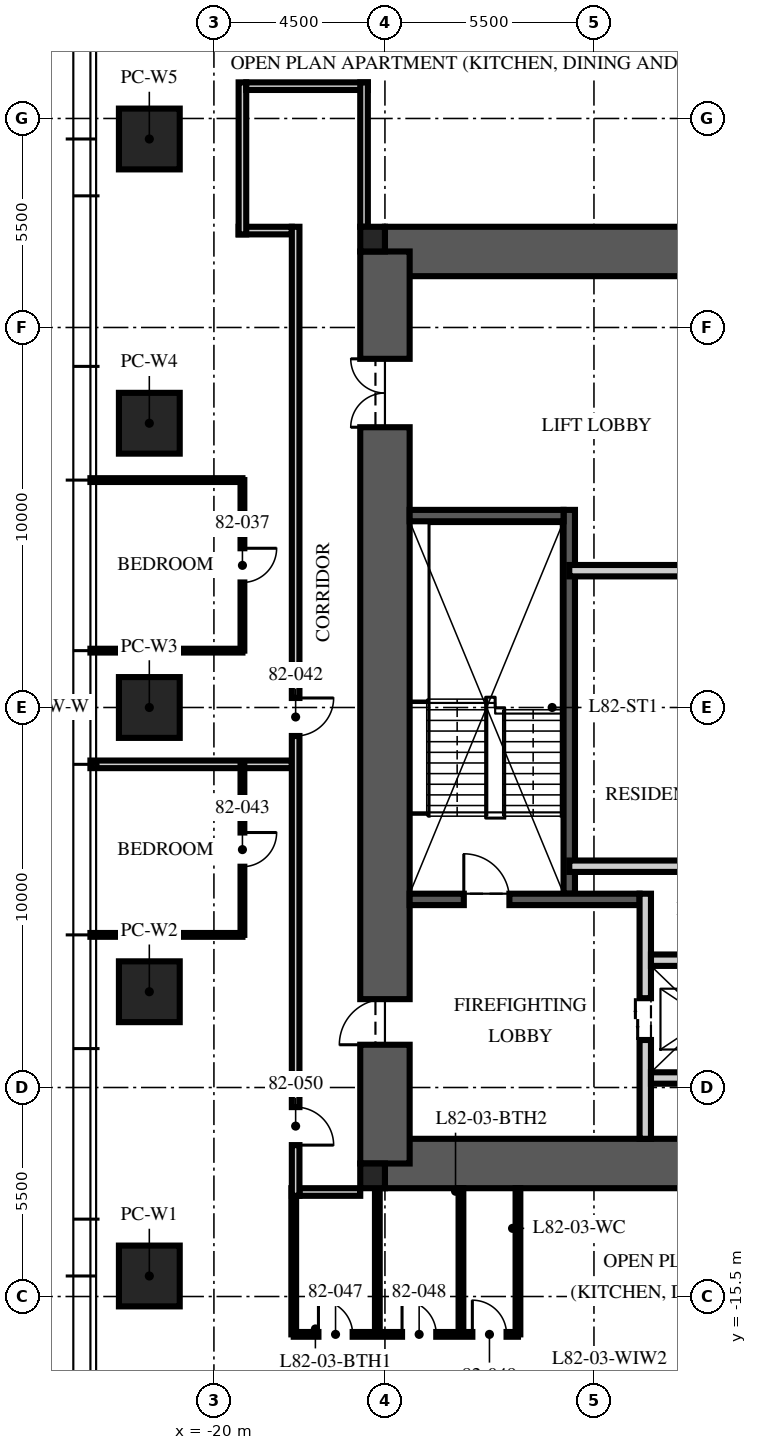
"""IFC4 building model, lengths in metres.
Left out: names, types, materials, properties, quantities, classifications, styles, units other than length and angle.
Written with IfcOpenShell. Run it as: python <this file> out.ifc"""

import sys

from ifc_helpers import new_model, si_unit, direction, frame, frame_2d, origin, origin_2d, place, context, subcontext, project, spatial, rectangle, extrude, element, fill, save


model = new_model("IFC4")
c1 = context("Model", 3, precision=1e-05, world=origin(), true_north=direction((0.0, 1.0)))
c2 = subcontext(c1, "Body", "Model", "MODEL_VIEW")
j1 = project(units=[si_unit("LENGTHUNIT", "METRE"), si_unit("PLANEANGLEUNIT", "RADIAN")], contexts=[c1])
p1 = place(None, origin())
s1 = spatial("IfcSite", under=j1, at=p1, CompositionType="ELEMENT")
p2 = place(p1, origin())
s2 = spatial("IfcBuilding", under=s1, at=p2, CompositionType="ELEMENT")
p3 = place(p2, frame((0.0, 0.0, 327.0)))
s3 = spatial("IfcBuildingStorey", under=s2, at=p3, CompositionType="ELEMENT", Elevation=327.0)
for number, where, z_axis, x_axis in (
    (1, (-15.5, 12.0, -0.25), (0.0, 0.0, 1.0), (1.0, 0.0, 0.0)),
    (2, (-15.5, -12.0, -0.25), (0.0, 0.0, 1.0), (1.0, 0.0, 0.0)),
):
    element("IfcWall", number, at=place(p3, frame(where, z_axis=z_axis, x_axis=x_axis)), inside=s3, PredefinedType="SHEAR", context=c2, shape_type="SweptSolid", body=[
        extrude(rectangle(XDim=31.0, YDim=1.3, at=frame_2d((15.5, 0.0))), origin(), (0.0, 0.0, 1.0), 3.75),
    ])
p4 = place(p3, frame((-15.5, -12.0, -0.25), z_axis=(0.0, 0.0, 1.0), x_axis=(0.0, 1.0, 0.0)))
e3 = element("IfcWall", 3, at=p4, inside=s3, PredefinedType="SHEAR", context=c2, shape_type="SweptSolid", body=[
    extrude(rectangle(XDim=24.0, YDim=1.3, at=frame_2d((12.0, 0.0))), origin(), (0.0, 0.0, 1.0), 3.75),
])
p5 = place(p4, frame((3.125, 0.0, 0.25)))
e4 = element("IfcOpeningElement", 4, at=p5, cuts=e3, PredefinedType="OPENING", context=c2, shape_type="SweptSolid", body=[
    extrude(rectangle(XDim=1.2, YDim=2.1, at=frame_2d((0.6, 1.05))), frame((0.0, 0.66, 0.0), z_axis=(0.0, -1.0, 0.0), x_axis=(1.0, 0.0, 0.0)), (0.0, 0.0, 1.0), 1.32),
])
p6 = place(p4, frame((19.375, 0.0, 0.25)))
e5 = element("IfcOpeningElement", 5, at=p6, cuts=e3, PredefinedType="OPENING", context=c2, shape_type="SweptSolid", body=[
    extrude(rectangle(XDim=1.8, YDim=2.1, at=frame_2d((0.9, 1.05))), frame((0.0, 0.66, 0.0), z_axis=(0.0, -1.0, 0.0), x_axis=(1.0, 0.0, 0.0)), (0.0, 0.0, 1.0), 1.32),
])
for number, where, z_axis, x_axis in (
    (6, (-15.825, 12.325, -0.25), (0.0, 0.0, 1.0), (1.0, 0.0, 0.0)),
    (7, (-15.825, -12.325, -0.25), (0.0, 0.0, 1.0), (1.0, 0.0, 0.0)),
):
    element("IfcColumn", number, at=place(p3, frame(where, z_axis=z_axis, x_axis=x_axis)), inside=s3, PredefinedType="COLUMN", context=c2, shape_type="SweptSolid", body=[
        extrude(rectangle(XDim=0.65, YDim=0.65, at=origin_2d()), origin(), (0.0, 0.0, 1.0), 3.75),
    ])
for number, where, z_axis, x_axis in (
    (8, (-21.7, -14.96, 0.0), (0.0, 0.0, 1.0), (0.0, 1.0, 0.0)),
    (9, (-21.7, -7.48, 0.0), (0.0, 0.0, 1.0), (0.0, 1.0, 0.0)),
    (10, (-21.7, 0.0, 0.0), (0.0, 0.0, 1.0), (0.0, 1.0, 0.0)),
    (11, (-21.7, 7.48, 0.0), (0.0, 0.0, 1.0), (0.0, 1.0, 0.0)),
    (12, (-21.7, 14.96, 0.0), (0.0, 0.0, 1.0), (0.0, 1.0, 0.0)),
):
    element("IfcColumn", number, at=place(p3, frame(where, z_axis=z_axis, x_axis=x_axis)), inside=s3, PredefinedType="COLUMN", context=c2, shape_type="SweptSolid", body=[
        extrude(rectangle(XDim=1.6, YDim=1.6, at=origin_2d()), origin(), (0.0, 0.0, 1.0), 3.75),
    ])
p7 = place(p3, frame((-10.65, -4.9, 0.0), z_axis=(0.0, 0.0, 1.0), x_axis=(0.0, 1.0, 0.0)))
e13 = element("IfcWall", 13, at=p7, inside=s3, PredefinedType="SOLIDWALL", context=c2, shape_type="SweptSolid", body=[
    extrude(rectangle(XDim=10.1, YDim=0.3, at=frame_2d((5.05, 0.0))), origin(), (0.0, 0.0, 1.0), 3.5),
])
p8 = place(p3, frame((-14.85, -5.05, 0.0), z_axis=(0.0, 0.0, 1.0), x_axis=(1.0, 0.0, 0.0)))
e14 = element("IfcWall", 14, at=p8, inside=s3, PredefinedType="SOLIDWALL", context=c2, shape_type="SweptSolid", body=[
    extrude(rectangle(XDim=6.05, YDim=0.3, at=frame_2d((3.025, 0.0))), origin(), (0.0, 0.0, 1.0), 3.5),
])
p9 = place(p8, frame((1.425, 0.0, 0.0)))
e15 = element("IfcOpeningElement", 15, at=p9, cuts=e14, PredefinedType="OPENING", context=c2, shape_type="SweptSolid", body=[
    extrude(rectangle(XDim=1.2, YDim=2.1, at=frame_2d((0.6, 1.05))), frame((0.0, 0.16, 0.0), z_axis=(0.0, -1.0, 0.0), x_axis=(1.0, 0.0, 0.0)), (0.0, 0.0, 1.0), 0.32),
])
p10 = place(p3, frame((-14.85, 5.05, 0.0), z_axis=(0.0, 0.0, 1.0), x_axis=(1.0, 0.0, 0.0)))
e16 = element("IfcWall", 16, at=p10, inside=s3, PredefinedType="SOLIDWALL", context=c2, shape_type="SweptSolid", body=[
    extrude(rectangle(XDim=4.05, YDim=0.3, at=frame_2d((2.025, 0.0))), origin(), (0.0, 0.0, 1.0), 3.5),
])
p11 = place(p3, frame((-8.65, -11.35, 0.0), z_axis=(0.0, 0.0, 1.0), x_axis=(0.0, 1.0, 0.0)))
e17 = element("IfcWall", 17, at=p11, inside=s3, PredefinedType="PARTITIONING", context=c2, shape_type="SweptSolid", body=[
    extrude(rectangle(XDim=6.45, YDim=0.3, at=frame_2d((3.225, 0.0))), origin(), (0.0, 0.0, 1.0), 3.5),
])
p12 = place(p11, frame((2.6, 0.0, 0.0)))
e18 = element("IfcOpeningElement", 18, at=p12, cuts=e17, PredefinedType="OPENING", context=c2, shape_type="SweptSolid", body=[
    extrude(rectangle(XDim=1.1, YDim=2.1, at=frame_2d((0.55, 1.05))), frame((0.0, 0.16, 0.0), z_axis=(0.0, -1.0, 0.0), x_axis=(1.0, 0.0, 0.0)), (0.0, 0.0, 1.0), 0.32),
])
p13 = place(p3, frame((-8.5, -6.65, 0.0), z_axis=(0.0, 0.0, 1.0), x_axis=(1.0, 0.0, 0.0)))
e19 = element("IfcWall", 19, at=p13, inside=s3, PredefinedType="PARTITIONING", context=c2, shape_type="SweptSolid", body=[
    extrude(rectangle(XDim=17.0, YDim=0.3, at=frame_2d((8.5, 0.0))), origin(), (0.0, 0.0, 1.0), 3.5),
])
p14 = place(p13, frame((7.8, 0.0, 0.0)))
e20 = element("IfcOpeningElement", 20, at=p14, cuts=e19, PredefinedType="OPENING", context=c2, shape_type="SweptSolid", body=[
    extrude(rectangle(XDim=1.3, YDim=2.4, at=frame_2d((0.65, 1.2))), frame((0.0, 0.16, 0.0), z_axis=(0.0, -1.0, 0.0), x_axis=(1.0, 0.0, 0.0)), (0.0, 0.0, 1.0), 0.32),
])
p15 = place(p13, frame((5.65, 0.0, 0.0)))
e21 = element("IfcOpeningElement", 21, at=p15, cuts=e19, PredefinedType="OPENING", context=c2, shape_type="SweptSolid", body=[
    extrude(rectangle(XDim=0.9, YDim=2.1, at=frame_2d((0.45, 1.05))), frame((0.0, 0.16, 0.0), z_axis=(0.0, -1.0, 0.0), x_axis=(1.0, 0.0, 0.0)), (0.0, 0.0, 1.0), 0.32),
])
p16 = place(p13, frame((10.4, 0.0, 0.0)))
e22 = element("IfcOpeningElement", 22, at=p16, cuts=e19, PredefinedType="OPENING", context=c2, shape_type="SweptSolid", body=[
    extrude(rectangle(XDim=0.9, YDim=2.1, at=frame_2d((0.45, 1.05))), frame((0.0, 0.16, 0.0), z_axis=(0.0, -1.0, 0.0), x_axis=(1.0, 0.0, 0.0)), (0.0, 0.0, 1.0), 0.32),
])
p17 = place(p3, frame((-8.5, -9.75, 0.0), z_axis=(0.0, 0.0, 1.0), x_axis=(1.0, 0.0, 0.0)))
e23 = element("IfcWall", 23, at=p17, inside=s3, PredefinedType="PARTITIONING", context=c2, shape_type="SweptSolid", body=[
    extrude(rectangle(XDim=2.9, YDim=0.3, at=frame_2d((1.45, 0.0))), origin(), (0.0, 0.0, 1.0), 3.5),
])
p18 = place(p3, frame((-10.65, 3.6, 0.0), z_axis=(0.0, 0.0, 1.0), x_axis=(1.0, 0.0, 0.0)))
e24 = element("IfcWall", 24, at=p18, inside=s3, PredefinedType="PARTITIONING", context=c2, shape_type="SweptSolid", body=[
    extrude(rectangle(XDim=21.3, YDim=0.3, at=frame_2d((10.65, 0.0))), origin(), (0.0, 0.0, 1.0), 3.5),
])
p19 = place(p18, frame((10.05, 0.0, 0.0)))
e25 = element("IfcOpeningElement", 25, at=p19, cuts=e24, PredefinedType="OPENING", context=c2, shape_type="SweptSolid", body=[
    extrude(rectangle(XDim=1.2, YDim=2.1, at=frame_2d((0.6, 1.05))), frame((0.0, 0.16, 0.0), z_axis=(0.0, -1.0, 0.0), x_axis=(1.0, 0.0, 0.0)), (0.0, 0.0, 1.0), 0.32),
])
p20 = place(p18, frame((19.238, 0.0, 0.0)))
e26 = element("IfcOpeningElement", 26, at=p20, cuts=e24, PredefinedType="OPENING", context=c2, shape_type="SweptSolid", body=[
    extrude(rectangle(XDim=0.9, YDim=2.1, at=frame_2d((0.45, 1.05))), frame((0.0, 0.16, 0.0), z_axis=(0.0, -1.0, 0.0), x_axis=(1.0, 0.0, 0.0)), (0.0, 0.0, 1.0), 0.32),
])
p21 = place(p3, frame((-10.65, -4.177, 0.0), z_axis=(0.0, 0.0, 1.0), x_axis=(1.0, 0.0, 0.0)))
e27 = element("IfcWall", 27, at=p21, inside=s3, PredefinedType="PARTITIONING", context=c2, shape_type="SweptSolid", body=[
    extrude(rectangle(XDim=6.45, YDim=0.3, at=frame_2d((3.225, 0.0))), origin(), (0.0, 0.0, 1.0), 3.5),
])
p22 = place(p3, frame((-17.95, 12.55, 0.0), z_axis=(0.0, 0.0, 1.0), x_axis=(-1.0, 0.0, 0.0)))
e28 = element("IfcWall", 28, at=p22, inside=s3, PredefinedType="PARTITIONING", context=c2, shape_type="SweptSolid", body=[
    extrude(rectangle(XDim=1.4, YDim=0.2, at=frame_2d((0.7, 0.0))), origin(), (0.0, 0.0, 1.0), 3.5),
])
p23 = place(p3, frame((-19.25, 12.45, 0.0), z_axis=(0.0, 0.0, 1.0), x_axis=(0.0, 1.0, 0.0)))
e29 = element("IfcWall", 29, at=p23, inside=s3, PredefinedType="PARTITIONING", context=c2, shape_type="SweptSolid", body=[
    extrude(rectangle(XDim=4.0, YDim=0.2, at=frame_2d((2.0, 0.0))), origin(), (0.0, 0.0, 1.0), 2.9),
])
p24 = place(p3, frame((-19.15, 16.35, 0.0), z_axis=(0.0, 0.0, 1.0), x_axis=(1.0, 0.0, 0.0)))
e30 = element("IfcWall", 30, at=p24, inside=s3, PredefinedType="PARTITIONING", context=c2, shape_type="SweptSolid", body=[
    extrude(rectangle(XDim=3.2, YDim=0.2, at=frame_2d((1.6, 0.0))), origin(), (0.0, 0.0, 1.0), 2.6),
])
p25 = place(p3, frame((-16.05, 16.45, 0.0), z_axis=(0.0, 0.0, 1.0), x_axis=(0.0, -1.0, 0.0)))
e31 = element("IfcWall", 31, at=p25, inside=s3, PredefinedType="PARTITIONING", context=c2, shape_type="SweptSolid", body=[
    extrude(rectangle(XDim=3.8, YDim=0.2, at=frame_2d((1.9, 0.0))), origin(), (0.0, 0.0, 1.0), 2.6),
])
p26 = place(p3, frame((-16.15, -12.75, 0.0), z_axis=(0.0, 0.0, 1.0), x_axis=(-1.0, 0.0, 0.0)))
e32 = element("IfcWall", 32, at=p26, inside=s3, PredefinedType="PARTITIONING", context=c2, shape_type="SweptSolid", body=[
    extrude(rectangle(XDim=1.6, YDim=0.2, at=frame_2d((0.8, 0.0))), origin(), (0.0, 0.0, 1.0), 2.6),
])
for number, where, z_axis, x_axis in (
    (33, (-19.25, 5.984, 0.0), (0.0, 0.0, 1.0), (-1.0, 0.0, 0.0)),
    (34, (-19.25, 1.496, 0.0), (0.0, 0.0, 1.0), (-1.0, 0.0, 0.0)),
):
    element("IfcWall", number, at=place(p3, frame(where, z_axis=z_axis, x_axis=x_axis)), inside=s3, PredefinedType="PARTITIONING", context=c2, shape_type="SweptSolid", body=[
        extrude(rectangle(XDim=4.0, YDim=0.1, at=frame_2d((2.0, 0.0))), origin(), (0.0, 0.0, 1.0), 3.01),
    ])
p27 = place(p3, frame((-17.95, -1.496, 0.0), z_axis=(0.0, 0.0, 1.0), x_axis=(-1.0, 0.0, 0.0)))
e35 = element("IfcWall", 35, at=p27, inside=s3, PredefinedType="PARTITIONING", context=c2, shape_type="SweptSolid", body=[
    extrude(rectangle(XDim=5.3, YDim=0.2, at=frame_2d((2.65, 0.0))), origin(), (0.0, 0.0, 1.0), 3.01),
])
p28 = place(p3, frame((-19.25, -5.984, 0.0), z_axis=(0.0, 0.0, 1.0), x_axis=(-1.0, 0.0, 0.0)))
e36 = element("IfcWall", 36, at=p28, inside=s3, PredefinedType="PARTITIONING", context=c2, shape_type="SweptSolid", body=[
    extrude(rectangle(XDim=4.0, YDim=0.1, at=frame_2d((2.0, 0.0))), origin(), (0.0, 0.0, 1.0), 3.01),
])
p29 = place(p3, frame((-19.25, 5.984, 0.0), z_axis=(0.0, 0.0, 1.0), x_axis=(0.0, -1.0, 0.0)))
e37 = element("IfcWall", 37, at=p29, inside=s3, PredefinedType="PARTITIONING", context=c2, shape_type="SweptSolid", body=[
    extrude(rectangle(XDim=4.488, YDim=0.1, at=frame_2d((2.244, 0.0))), origin(), (0.0, 0.0, 1.0), 2.91),
])
p30 = place(p29, frame((1.794, 0.0, 0.0)))
e38 = element("IfcOpeningElement", 38, at=p30, cuts=e37, PredefinedType="OPENING", context=c2, shape_type="SweptSolid", body=[
    extrude(rectangle(XDim=0.9, YDim=2.1, at=frame_2d((0.45, 1.05))), frame((0.0, 0.06, 0.0), z_axis=(0.0, -1.0, 0.0), x_axis=(1.0, 0.0, 0.0)), (0.0, 0.0, 1.0), 0.12),
])
p31 = place(p3, frame((-19.25, -1.496, 0.0), z_axis=(0.0, 0.0, 1.0), x_axis=(0.0, -1.0, 0.0)))
e39 = element("IfcWall", 39, at=p31, inside=s3, PredefinedType="PARTITIONING", context=c2, shape_type="SweptSolid", body=[
    extrude(rectangle(XDim=4.488, YDim=0.1, at=frame_2d((2.244, 0.0))), origin(), (0.0, 0.0, 1.0), 2.91),
])
p32 = place(p31, frame((1.794, 0.0, 0.0)))
e40 = element("IfcOpeningElement", 40, at=p32, cuts=e39, PredefinedType="OPENING", context=c2, shape_type="SweptSolid", body=[
    extrude(rectangle(XDim=0.9, YDim=2.1, at=frame_2d((0.45, 1.05))), frame((0.0, 0.06, 0.0), z_axis=(0.0, -1.0, 0.0), x_axis=(1.0, 0.0, 0.0)), (0.0, 0.0, 1.0), 0.12),
])
p33 = place(p3, frame((-17.9, -16.496, 0.0), z_axis=(0.0, 0.0, 1.0), x_axis=(1.0, 0.0, 0.0)))
e41 = element("IfcWall", 41, at=p33, inside=s3, PredefinedType="PARTITIONING", context=c2, shape_type="SweptSolid", body=[
    extrude(rectangle(XDim=5.9, YDim=0.125, at=frame_2d((2.95, 0.0))), origin(), (0.0, 0.0, 1.0), 2.9),
])
p34 = place(p33, frame((0.65, 0.0, 0.0)))
e42 = element("IfcOpeningElement", 42, at=p34, cuts=e41, PredefinedType="OPENING", context=c2, shape_type="SweptSolid", body=[
    extrude(rectangle(XDim=0.9, YDim=2.1, at=frame_2d((0.45, 1.05))), frame((0.0, 0.073, 0.0), z_axis=(0.0, -1.0, 0.0), x_axis=(1.0, 0.0, 0.0)), (0.0, 0.0, 1.0), 0.145),
])
p35 = place(p33, frame((2.85, 0.0, 0.0)))
e43 = element("IfcOpeningElement", 43, at=p35, cuts=e41, PredefinedType="OPENING", context=c2, shape_type="SweptSolid", body=[
    extrude(rectangle(XDim=0.9, YDim=2.1, at=frame_2d((0.45, 1.05))), frame((0.0, 0.073, 0.0), z_axis=(0.0, -1.0, 0.0), x_axis=(1.0, 0.0, 0.0)), (0.0, 0.0, 1.0), 0.145),
])
p36 = place(p33, frame((4.7, 0.0, 0.0)))
e44 = element("IfcOpeningElement", 44, at=p36, cuts=e41, PredefinedType="OPENING", context=c2, shape_type="SweptSolid", body=[
    extrude(rectangle(XDim=0.9, YDim=2.1, at=frame_2d((0.45, 1.05))), frame((0.0, 0.073, 0.0), z_axis=(0.0, -1.0, 0.0), x_axis=(1.0, 0.0, 0.0)), (0.0, 0.0, 1.0), 0.145),
])
for number, where, z_axis, x_axis in (
    (45, (-17.9, -12.65, 0.0), (0.0, 0.0, 1.0), (0.0, -1.0, 0.0)),
    (46, (-15.7, -12.65, 0.0), (0.0, 0.0, 1.0), (0.0, -1.0, 0.0)),
):
    element("IfcWall", number, at=place(p3, frame(where, z_axis=z_axis, x_axis=x_axis)), inside=s3, PredefinedType="PARTITIONING", context=c2, shape_type="SweptSolid", body=[
        extrude(rectangle(XDim=3.846, YDim=0.125, at=frame_2d((1.923, 0.0))), origin(), (0.0, 0.0, 1.0), 2.6),
    ])
for number, where, z_axis, x_axis in (
    (47, (-13.5, -12.65, 0.0), (0.0, 0.0, 1.0), (0.0, -1.0, 0.0)),
    (48, (-12.0, -12.65, 0.0), (0.0, 0.0, 1.0), (0.0, -1.0, 0.0)),
):
    element("IfcWall", number, at=place(p3, frame(where, z_axis=z_axis, x_axis=x_axis)), inside=s3, PredefinedType="PARTITIONING", context=c2, shape_type="SweptSolid", body=[
        extrude(rectangle(XDim=3.846, YDim=0.125, at=frame_2d((1.923, 0.0))), origin(), (0.0, 0.0, 1.0), 3.5),
    ])
p37 = place(p3, frame((-17.85, 12.65, 0.0), z_axis=(0.0, 0.0, 1.0), x_axis=(0.0, -1.0, 0.0)))
e49 = element("IfcWall", 49, at=p37, inside=s3, PredefinedType="PARTITIONING", context=c2, shape_type="SweptSolid", body=[
    extrude(rectangle(XDim=25.5, YDim=0.2, at=frame_2d((12.75, 0.0))), origin(), (0.0, 0.0, 1.0), 2.9),
])
p38 = place(p37, frame((12.4, 0.0, 0.0)))
e50 = element("IfcOpeningElement", 50, at=p38, cuts=e49, PredefinedType="OPENING", context=c2, shape_type="SweptSolid", body=[
    extrude(rectangle(XDim=1.0, YDim=2.2, at=frame_2d((0.5, 1.1))), frame((0.0, 0.11, 0.0), z_axis=(0.0, -1.0, 0.0), x_axis=(1.0, 0.0, 0.0)), (0.0, 0.0, 1.0), 0.22),
])
p39 = place(p37, frame((23.166, 0.0, 0.0)))
e51 = element("IfcOpeningElement", 51, at=p39, cuts=e49, PredefinedType="OPENING", context=c2, shape_type="SweptSolid", body=[
    extrude(rectangle(XDim=1.0, YDim=2.2, at=frame_2d((0.5, 1.1))), frame((0.0, 0.11, 0.0), z_axis=(0.0, -1.0, 0.0), x_axis=(1.0, 0.0, 0.0)), (0.0, 0.0, 1.0), 0.22),
])
p40 = place(p9, origin())
e52 = element("IfcDoor", 52, at=p40, inside=s3, OperationType="SINGLE_SWING_LEFT", PredefinedType="DOOR", context=c2, shape_type="SweptSolid", body=[
    extrude(rectangle(XDim=1.2, YDim=2.1, at=frame_2d((0.6, 1.05))), frame((0.0, 0.025, 0.0), z_axis=(0.0, -1.0, 0.0), x_axis=(1.0, 0.0, 0.0)), (0.0, 0.0, 1.0), 0.05),
])
fill(e15, e52)
p41 = place(p5, origin())
e53 = element("IfcDoor", 53, at=p41, inside=s3, OperationType="SINGLE_SWING_LEFT", PredefinedType="DOOR", context=c2, shape_type="SweptSolid", body=[
    extrude(rectangle(XDim=1.2, YDim=2.1, at=frame_2d((0.6, 1.05))), frame((0.0, 0.025, 0.0), z_axis=(0.0, -1.0, 0.0), x_axis=(1.0, 0.0, 0.0)), (0.0, 0.0, 1.0), 0.05),
])
fill(e4, e53)
p42 = place(p6, origin())
e54 = element("IfcDoor", 54, at=p42, inside=s3, OperationType="DOUBLE_DOOR_SINGLE_SWING", PredefinedType="DOOR", context=c2, shape_type="SweptSolid", body=[
    extrude(rectangle(XDim=1.8, YDim=2.1, at=frame_2d((0.9, 1.05))), frame((0.0, 0.025, 0.0), z_axis=(0.0, -1.0, 0.0), x_axis=(1.0, 0.0, 0.0)), (0.0, 0.0, 1.0), 0.05),
])
fill(e5, e54)
p43 = place(p12, origin())
e55 = element("IfcDoor", 55, at=p43, inside=s3, OperationType="DOUBLE_DOOR_SLIDING", PredefinedType="DOOR", context=c2, shape_type="SweptSolid", body=[
    extrude(rectangle(XDim=1.1, YDim=2.1, at=frame_2d((0.55, 1.05))), frame((0.0, 0.025, 0.0), z_axis=(0.0, -1.0, 0.0), x_axis=(1.0, 0.0, 0.0)), (0.0, 0.0, 1.0), 0.05),
])
fill(e18, e55)
p44 = place(p30, origin())
e56 = element("IfcDoor", 56, at=p44, inside=s3, OperationType="SINGLE_SWING_LEFT", PredefinedType="DOOR", context=c2, shape_type="SweptSolid", body=[
    extrude(rectangle(XDim=0.9, YDim=2.1, at=frame_2d((0.45, 1.05))), frame((0.0, 0.025, 0.0), z_axis=(0.0, -1.0, 0.0), x_axis=(1.0, 0.0, 0.0)), (0.0, 0.0, 1.0), 0.05),
])
fill(e38, e56)
p45 = place(p38, origin())
e57 = element("IfcDoor", 57, at=p45, inside=s3, OperationType="SINGLE_SWING_LEFT", PredefinedType="DOOR", context=c2, shape_type="SweptSolid", body=[
    extrude(rectangle(XDim=1.0, YDim=2.2, at=frame_2d((0.5, 1.1))), frame((0.0, 0.025, 0.0), z_axis=(0.0, -1.0, 0.0), x_axis=(1.0, 0.0, 0.0)), (0.0, 0.0, 1.0), 0.05),
])
fill(e50, e57)
p46 = place(p32, origin())
e58 = element("IfcDoor", 58, at=p46, inside=s3, OperationType="SINGLE_SWING_LEFT", PredefinedType="DOOR", context=c2, shape_type="SweptSolid", body=[
    extrude(rectangle(XDim=0.9, YDim=2.1, at=frame_2d((0.45, 1.05))), frame((0.0, 0.025, 0.0), z_axis=(0.0, -1.0, 0.0), x_axis=(1.0, 0.0, 0.0)), (0.0, 0.0, 1.0), 0.05),
])
fill(e40, e58)
p47 = place(p34, origin())
e59 = element("IfcDoor", 59, at=p47, inside=s3, OperationType="SINGLE_SWING_LEFT", PredefinedType="DOOR", context=c2, shape_type="SweptSolid", body=[
    extrude(rectangle(XDim=0.9, YDim=2.1, at=frame_2d((0.45, 1.05))), frame((0.0, 0.025, 0.0), z_axis=(0.0, -1.0, 0.0), x_axis=(1.0, 0.0, 0.0)), (0.0, 0.0, 1.0), 0.05),
])
fill(e42, e59)
p48 = place(p35, origin())
e60 = element("IfcDoor", 60, at=p48, inside=s3, OperationType="SINGLE_SWING_LEFT", PredefinedType="DOOR", context=c2, shape_type="SweptSolid", body=[
    extrude(rectangle(XDim=0.9, YDim=2.1, at=frame_2d((0.45, 1.05))), frame((0.0, 0.025, 0.0), z_axis=(0.0, -1.0, 0.0), x_axis=(1.0, 0.0, 0.0)), (0.0, 0.0, 1.0), 0.05),
])
fill(e43, e60)
p49 = place(p36, origin())
e61 = element("IfcDoor", 61, at=p49, inside=s3, OperationType="SINGLE_SWING_LEFT", PredefinedType="DOOR", context=c2, shape_type="SweptSolid", body=[
    extrude(rectangle(XDim=0.9, YDim=2.1, at=frame_2d((0.45, 1.05))), frame((0.0, 0.025, 0.0), z_axis=(0.0, -1.0, 0.0), x_axis=(1.0, 0.0, 0.0)), (0.0, 0.0, 1.0), 0.05),
])
fill(e44, e61)
p50 = place(p39, origin())
e62 = element("IfcDoor", 62, at=p50, inside=s3, OperationType="SINGLE_SWING_RIGHT", PredefinedType="DOOR", context=c2, shape_type="SweptSolid", body=[
    extrude(rectangle(XDim=1.0, YDim=2.2, at=frame_2d((0.5, 1.1))), frame((0.0, 0.025, 0.0), z_axis=(0.0, -1.0, 0.0), x_axis=(1.0, 0.0, 0.0)), (0.0, 0.0, 1.0), 0.05),
])
fill(e51, e62)
save(model, sys.argv[1])
